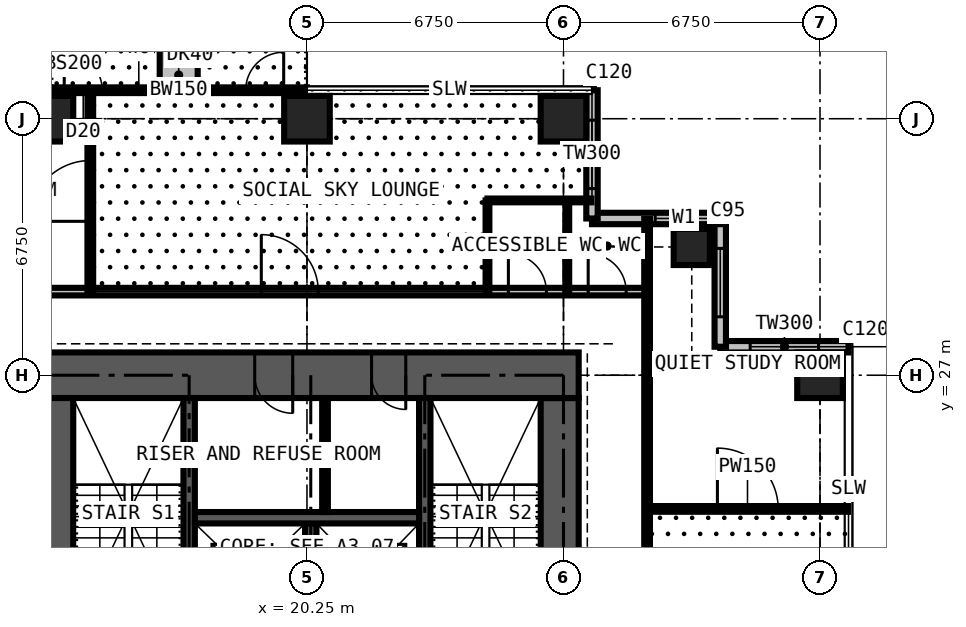
"""IFC4 building model, lengths in metres.
Left out: names, types, materials, properties, quantities, classifications, styles, units other than length and angle.
Written with IfcOpenShell. Run it as: python <this file> out.ifc"""

import sys

from ifc_helpers import new_model, si_unit, direction, frame, frame_2d, origin, origin_2d, place, context, subcontext, project, spatial, rectangle, extrude, element, fill, save


model = new_model("IFC4")
c1 = context("Model", 3, precision=1e-05, world=origin(), true_north=direction((0.0, 1.0)))
c2 = subcontext(c1, "Body", "Model", "MODEL_VIEW")
j1 = project(units=[si_unit("LENGTHUNIT", "METRE"), si_unit("PLANEANGLEUNIT", "RADIAN")], contexts=[c1])
p1 = place(None, origin())
s1 = spatial("IfcSite", under=j1, at=p1, CompositionType="ELEMENT")
p2 = place(p1, origin())
s2 = spatial("IfcBuilding", under=s1, at=p2, CompositionType="ELEMENT")
p3 = place(p2, frame((0.0, 0.0, 171.0)))
s3 = spatial("IfcBuildingStorey", under=s2, at=p3, CompositionType="ELEMENT", Elevation=171.0)
for number, where, z_axis, x_axis in (
    (1, (13.5, 33.75, 0.0), (0.0, 0.0, 1.0), (1.0, 0.0, 0.0)),
    (2, (20.25, 33.75, 0.0), (0.0, 0.0, 1.0), (1.0, 0.0, 0.0)),
    (3, (27.0, 33.75, 0.0), (0.0, 0.0, 1.0), (1.0, 0.0, 0.0)),
):
    element("IfcColumn", number, at=place(p3, frame(where, z_axis=z_axis, x_axis=x_axis)), inside=s3, PredefinedType="COLUMN", context=c2, shape_type="SweptSolid", body=[
        extrude(rectangle(XDim=1.2, YDim=1.2, at=origin_2d()), origin(), (0.0, 0.0, 1.0), 3.6),
    ])
p4 = place(p3, frame((30.375, 30.375, 0.0), z_axis=(0.0, 0.0, 1.0), x_axis=(1.0, 0.0, 0.0)))
e4 = element("IfcColumn", 4, at=p4, inside=s3, PredefinedType="COLUMN", context=c2, shape_type="SweptSolid", body=[
    extrude(rectangle(XDim=0.95, YDim=0.95, at=origin_2d()), origin(), (0.0, 0.0, 1.0), 3.6),
])
p5 = place(p3, frame((33.75, 27.0, 0.0), z_axis=(0.0, 0.0, 1.0), x_axis=(1.0, 0.0, 0.0)))
e5 = element("IfcColumn", 5, at=p5, inside=s3, PredefinedType="COLUMN", context=c2, shape_type="SweptSolid", body=[
    extrude(rectangle(XDim=1.2, YDim=1.2, at=origin_2d()), origin(), (0.0, 0.0, 1.0), 3.6),
])
p6 = place(p3, frame((26.9, 14.1, 0.0), z_axis=(0.0, 0.0, 1.0), x_axis=(0.0, 1.0, 0.0)))
e6 = element("IfcWall", 6, at=p6, inside=s3, PredefinedType="SHEAR", context=c2, shape_type="SweptSolid", body=[
    extrude(rectangle(XDim=12.3, YDim=1.0, at=frame_2d((6.15, 0.0))), origin(), (0.0, 0.0, 1.0), 3.6),
])
p7 = place(p6, frame((3.65, 0.0, 0.0)))
e7 = element("IfcOpeningElement", 7, at=p7, cuts=e6, PredefinedType="OPENING", context=c2, shape_type="SweptSolid", body=[
    extrude(rectangle(XDim=1.2, YDim=2.2, at=frame_2d((0.6, 1.1))), frame((0.0, 0.51, 0.0), z_axis=(0.0, -1.0, 0.0), x_axis=(1.0, 0.0, 0.0)), (0.0, 0.0, 1.0), 1.02),
])
p8 = place(p3, frame((27.4, 27.0, 0.0), z_axis=(0.0, 0.0, 1.0), x_axis=(-1.0, 0.0, 0.0)))
e8 = element("IfcWall", 8, at=p8, inside=s3, PredefinedType="SHEAR", context=c2, shape_type="SweptSolid", body=[
    extrude(rectangle(XDim=14.3, YDim=1.2, at=frame_2d((7.15, 0.0))), origin(), (0.0, 0.0, 1.0), 3.6),
])
p9 = place(p8, frame((4.55, 0.0, 0.0)))
e9 = element("IfcOpeningElement", 9, at=p9, cuts=e8, PredefinedType="OPENING", context=c2, shape_type="SweptSolid", body=[
    extrude(rectangle(XDim=0.9, YDim=2.2, at=frame_2d((0.45, 1.1))), frame((0.0, 0.61, 0.0), z_axis=(0.0, -1.0, 0.0), x_axis=(1.0, 0.0, 0.0)), (0.0, 0.0, 1.0), 1.22),
])
p10 = place(p8, frame((7.525, 0.0, 0.0)))
e10 = element("IfcOpeningElement", 10, at=p10, cuts=e8, PredefinedType="OPENING", context=c2, shape_type="SweptSolid", body=[
    extrude(rectangle(XDim=1.0, YDim=2.2, at=frame_2d((0.5, 1.1))), frame((0.0, 0.61, 0.0), z_axis=(0.0, -1.0, 0.0), x_axis=(1.0, 0.0, 0.0)), (0.0, 0.0, 1.0), 1.22),
])
p11 = place(p3, frame((13.6, 26.4, 0.0), z_axis=(0.0, 0.0, 1.0), x_axis=(0.0, -1.0, 0.0)))
e11 = element("IfcWall", 11, at=p11, inside=s3, PredefinedType="SHEAR", context=c2, shape_type="SweptSolid", body=[
    extrude(rectangle(XDim=12.3, YDim=1.0, at=frame_2d((6.15, 0.0))), origin(), (0.0, 0.0, 1.0), 3.6),
])
p12 = place(p11, frame((7.45, 0.0, 0.0)))
e12 = element("IfcOpeningElement", 12, at=p12, cuts=e11, PredefinedType="OPENING", context=c2, shape_type="SweptSolid", body=[
    extrude(rectangle(XDim=1.2, YDim=2.2, at=frame_2d((0.6, 1.1))), frame((0.0, 0.51, 0.0), z_axis=(0.0, -1.0, 0.0), x_axis=(1.0, 0.0, 0.0)), (0.0, 0.0, 1.0), 1.02),
])
p13 = place(p3, frame((34.5, 27.75, 0.0), z_axis=(0.0, 0.0, 1.0), x_axis=(-1.0, 0.0, 0.0)))
e13 = element("IfcWall", 13, at=p13, inside=s3, PredefinedType="SOLIDWALL", context=c2, shape_type="SweptSolid", body=[
    extrude(rectangle(XDim=3.375, YDim=0.3, at=frame_2d((1.688, 0.0))), origin(), (0.0, 0.0, 1.0), 3.375),
])
p14 = place(p13, frame((0.788, 0.0, 0.6)))
e14 = element("IfcOpeningElement", 14, at=p14, cuts=e13, PredefinedType="OPENING", context=c2, shape_type="SweptSolid", body=[
    extrude(rectangle(XDim=1.8, YDim=2.1, at=frame_2d((0.9, 1.05))), frame((0.0, 0.16, 0.0), z_axis=(0.0, -1.0, 0.0), x_axis=(1.0, 0.0, 0.0)), (0.0, 0.0, 1.0), 0.32),
])
p15 = place(p3, frame((31.125, 27.75, 0.0), z_axis=(0.0, 0.0, 1.0), x_axis=(0.0, 1.0, 0.0)))
e15 = element("IfcWall", 15, at=p15, inside=s3, PredefinedType="SOLIDWALL", context=c2, shape_type="SweptSolid", body=[
    extrude(rectangle(XDim=3.375, YDim=0.3, at=frame_2d((1.688, 0.0))), origin(), (0.0, 0.0, 1.0), 3.375),
])
p16 = place(p15, frame((0.788, 0.0, 0.6)))
e16 = element("IfcOpeningElement", 16, at=p16, cuts=e15, PredefinedType="OPENING", context=c2, shape_type="SweptSolid", body=[
    extrude(rectangle(XDim=1.8, YDim=2.1, at=frame_2d((0.9, 1.05))), frame((0.0, 0.16, 0.0), z_axis=(0.0, -1.0, 0.0), x_axis=(1.0, 0.0, 0.0)), (0.0, 0.0, 1.0), 0.32),
])
p17 = place(p3, frame((31.125, 31.125, 0.0), z_axis=(0.0, 0.0, 1.0), x_axis=(-1.0, 0.0, 0.0)))
e17 = element("IfcWall", 17, at=p17, inside=s3, PredefinedType="SOLIDWALL", context=c2, shape_type="SweptSolid", body=[
    extrude(rectangle(XDim=3.375, YDim=0.3, at=frame_2d((1.688, 0.0))), origin(), (0.0, 0.0, 1.0), 3.375),
])
p18 = place(p17, frame((0.212, 0.0, 0.9)))
e18 = element("IfcOpeningElement", 18, at=p18, cuts=e17, PredefinedType="OPENING", context=c2, shape_type="SweptSolid", body=[
    extrude(rectangle(XDim=1.5, YDim=1.8, at=frame_2d((0.75, 0.9))), frame((0.0, 0.16, 0.0), z_axis=(0.0, -1.0, 0.0), x_axis=(1.0, 0.0, 0.0)), (0.0, 0.0, 1.0), 0.32),
])
p19 = place(p3, frame((27.75, 31.125, 0.0), z_axis=(0.0, 0.0, 1.0), x_axis=(0.0, 1.0, 0.0)))
e19 = element("IfcWall", 19, at=p19, inside=s3, PredefinedType="SOLIDWALL", context=c2, shape_type="SweptSolid", body=[
    extrude(rectangle(XDim=3.375, YDim=0.3, at=frame_2d((1.688, 0.0))), origin(), (0.0, 0.0, 1.0), 3.375),
])
p20 = place(p19, frame((0.788, 0.0, 0.6)))
e20 = element("IfcOpeningElement", 20, at=p20, cuts=e19, PredefinedType="OPENING", context=c2, shape_type="SweptSolid", body=[
    extrude(rectangle(XDim=1.8, YDim=2.1, at=frame_2d((0.9, 1.05))), frame((0.0, 0.16, 0.0), z_axis=(0.0, -1.0, 0.0), x_axis=(1.0, 0.0, 0.0)), (0.0, 0.0, 1.0), 0.32),
])
p21 = place(p3, frame((13.5, 34.5, 0.0), z_axis=(0.0, 0.0, 1.0), x_axis=(1.0, 0.0, 0.0)))
e21 = element("IfcWall", 21, at=p21, inside=s3, PredefinedType="SOLIDWALL", context=c2, shape_type="SweptSolid", body=[
    extrude(rectangle(XDim=6.75, YDim=0.15, at=frame_2d((3.375, 0.0))), origin(), (0.0, 0.0, 1.0), 3.375),
])
p22 = place(p21, frame((0.363, 0.0, 0.0)))
e22 = element("IfcOpeningElement", 22, at=p22, cuts=e21, PredefinedType="OPENING", context=c2, shape_type="SweptSolid", body=[
    extrude(rectangle(XDim=1.0, YDim=2.2, at=frame_2d((0.5, 1.1))), frame((0.0, 0.085, 0.0), z_axis=(0.0, -1.0, 0.0), x_axis=(1.0, 0.0, 0.0)), (0.0, 0.0, 1.0), 0.17),
])
p23 = place(p21, frame((1.725, 0.0, 0.9)))
e23 = element("IfcOpeningElement", 23, at=p23, cuts=e21, PredefinedType="OPENING", context=c2, shape_type="SweptSolid", body=[
    extrude(rectangle(XDim=1.2, YDim=1.8, at=frame_2d((0.6, 0.9))), frame((0.0, 0.085, 0.0), z_axis=(0.0, -1.0, 0.0), x_axis=(1.0, 0.0, 0.0)), (0.0, 0.0, 1.0), 0.17),
])
p24 = place(p21, frame((5.137, 0.0, 0.0)))
e24 = element("IfcOpeningElement", 24, at=p24, cuts=e21, PredefinedType="OPENING", context=c2, shape_type="SweptSolid", body=[
    extrude(rectangle(XDim=1.0, YDim=2.2, at=frame_2d((0.5, 1.1))), frame((0.0, 0.085, 0.0), z_axis=(0.0, -1.0, 0.0), x_axis=(1.0, 0.0, 0.0)), (0.0, 0.0, 1.0), 0.17),
])
p25 = place(p21, frame((3.825, 0.0, 0.9)))
e25 = element("IfcOpeningElement", 25, at=p25, cuts=e21, PredefinedType="OPENING", context=c2, shape_type="SweptSolid", body=[
    extrude(rectangle(XDim=1.2, YDim=1.8, at=frame_2d((0.6, 0.9))), frame((0.0, 0.085, 0.0), z_axis=(0.0, -1.0, 0.0), x_axis=(1.0, 0.0, 0.0)), (0.0, 0.0, 1.0), 0.17),
])
p26 = place(p3, frame((16.875, 34.6, 0.0), z_axis=(0.0, 0.0, 1.0), x_axis=(0.0, 1.0, 0.0)))
e26 = element("IfcWall", 26, at=p26, inside=s3, PredefinedType="USERDEFINED", context=c2, shape_type="SweptSolid", body=[
    extrude(rectangle(XDim=2.2, YDim=1.0, at=frame_2d((1.1, 0.0))), origin(), (0.0, 0.0, 1.0), 0.9),
])
for number, where, z_axis, x_axis in (
    (27, (17.15, 20.3, 0.0), (0.0, 0.0, 1.0), (0.0, 1.0, 0.0)),
    (28, (23.35, 20.3, 0.0), (0.0, 0.0, 1.0), (0.0, 1.0, 0.0)),
):
    element("IfcWall", number, at=place(p3, frame(where, z_axis=z_axis, x_axis=x_axis)), inside=s3, PredefinedType="SHEAR", context=c2, shape_type="SweptSolid", body=[
        extrude(rectangle(XDim=6.1, YDim=0.3, at=frame_2d((3.05, 0.0))), origin(), (0.0, 0.0, 1.0), 3.6),
    ])
p27 = place(p3, frame((20.35, 20.3, 0.0), z_axis=(0.0, 0.0, 1.0), x_axis=(0.0, 1.0, 0.0)))
e29 = element("IfcWall", 29, at=p27, inside=s3, PredefinedType="SHEAR", context=c2, shape_type="SweptSolid", body=[
    extrude(rectangle(XDim=2.8, YDim=0.3, at=frame_2d((1.4, 0.0))), origin(), (0.0, 0.0, 1.0), 3.6),
])
p28 = place(p3, frame((17.3, 23.25, 0.0), z_axis=(0.0, 0.0, 1.0), x_axis=(1.0, 0.0, 0.0)))
e30 = element("IfcWall", 30, at=p28, inside=s3, PredefinedType="SHEAR", context=c2, shape_type="SweptSolid", body=[
    extrude(rectangle(XDim=5.9, YDim=0.3, at=frame_2d((2.95, 0.0))), origin(), (0.0, 0.0, 1.0), 3.6),
])
p29 = place(p3, frame((20.725, 23.4, 0.0), z_axis=(0.0, 0.0, 1.0), x_axis=(0.0, 1.0, 0.0)))
e31 = element("IfcWall", 31, at=p29, inside=s3, PredefinedType="PARTITIONING", context=c2, shape_type="SweptSolid", body=[
    extrude(rectangle(XDim=3.0, YDim=0.15, at=frame_2d((1.5, 0.0))), origin(), (0.0, 0.0, 1.0), 3.375),
])
p30 = place(p3, frame((11.3, 29.2, 0.0), z_axis=(0.0, 0.0, 1.0), x_axis=(1.0, 0.0, 0.0)))
e32 = element("IfcWall", 32, at=p30, inside=s3, PredefinedType="PARTITIONING", context=c2, shape_type="SweptSolid", body=[
    extrude(rectangle(XDim=17.9, YDim=0.2, at=frame_2d((8.95, 0.0))), origin(), (0.0, 0.0, 1.0), 3.375),
])
p31 = place(p30, frame((14.25, 0.0, 0.0)))
e33 = element("IfcOpeningElement", 33, at=p31, cuts=e32, PredefinedType="OPENING", context=c2, shape_type="SweptSolid", body=[
    extrude(rectangle(XDim=1.0, YDim=2.2, at=frame_2d((0.5, 1.1))), frame((0.0, 0.11, 0.0), z_axis=(0.0, -1.0, 0.0), x_axis=(1.0, 0.0, 0.0)), (0.0, 0.0, 1.0), 0.22),
])
p32 = place(p30, frame((16.35, 0.0, 0.0)))
e34 = element("IfcOpeningElement", 34, at=p32, cuts=e32, PredefinedType="OPENING", context=c2, shape_type="SweptSolid", body=[
    extrude(rectangle(XDim=1.0, YDim=2.2, at=frame_2d((0.5, 1.1))), frame((0.0, 0.11, 0.0), z_axis=(0.0, -1.0, 0.0), x_axis=(1.0, 0.0, 0.0)), (0.0, 0.0, 1.0), 0.22),
])
p33 = place(p30, frame((7.749, 0.0, 0.0)))
e35 = element("IfcOpeningElement", 35, at=p33, cuts=e32, PredefinedType="OPENING", context=c2, shape_type="SweptSolid", body=[
    extrude(rectangle(XDim=1.5, YDim=2.2, at=frame_2d((0.75, 1.1))), frame((0.0, 0.11, 0.0), z_axis=(0.0, -1.0, 0.0), x_axis=(1.0, 0.0, 0.0)), (0.0, 0.0, 1.0), 0.22),
])
p34 = place(p3, frame((14.549, 29.2, 0.0), z_axis=(0.0, 0.0, 1.0), x_axis=(0.0, 1.0, 0.0)))
e36 = element("IfcWall", 36, at=p34, inside=s3, PredefinedType="PARTITIONING", context=c2, shape_type="SweptSolid", body=[
    extrude(rectangle(XDim=5.225, YDim=0.15, at=frame_2d((2.613, 0.0))), origin(), (0.0, 0.0, 1.0), 3.375),
])
p35 = place(p34, frame((1.85, 0.0, 0.0)))
e37 = element("IfcOpeningElement", 37, at=p35, cuts=e36, PredefinedType="OPENING", context=c2, shape_type="SweptSolid", body=[
    extrude(rectangle(XDim=1.6, YDim=2.4, at=frame_2d((0.8, 1.2))), frame((0.0, 0.085, 0.0), z_axis=(0.0, -1.0, 0.0), x_axis=(1.0, 0.0, 0.0)), (0.0, 0.0, 1.0), 0.17),
])
p36 = place(p3, frame((25.0, 29.2, 0.0), z_axis=(0.0, 0.0, 1.0), x_axis=(0.0, 1.0, 0.0)))
e38 = element("IfcWall", 38, at=p36, inside=s3, PredefinedType="PARTITIONING", context=c2, shape_type="SweptSolid", body=[
    extrude(rectangle(XDim=2.4, YDim=0.1, at=frame_2d((1.2, 0.0))), origin(), (0.0, 0.0, 1.0), 3.375),
])
p37 = place(p3, frame((25.0, 31.6, 0.0), z_axis=(0.0, 0.0, 1.0), x_axis=(1.0, 0.0, 0.0)))
e39 = element("IfcWall", 39, at=p37, inside=s3, PredefinedType="PARTITIONING", context=c2, shape_type="SweptSolid", body=[
    extrude(rectangle(XDim=2.734, YDim=0.1, at=frame_2d((1.367, 0.0))), origin(), (0.0, 0.0, 1.0), 3.375),
])
p38 = place(p3, frame((27.1, 29.2, 0.0), z_axis=(0.0, 0.0, 1.0), x_axis=(0.0, 1.0, 0.0)))
e40 = element("IfcWall", 40, at=p38, inside=s3, PredefinedType="PARTITIONING", context=c2, shape_type="SweptSolid", body=[
    extrude(rectangle(XDim=2.4, YDim=0.1, at=frame_2d((1.2, 0.0))), origin(), (0.0, 0.0, 1.0), 2.806),
])
p39 = place(p3, frame((29.2, 11.3, 0.0), z_axis=(0.0, 0.0, 1.0), x_axis=(0.0, 1.0, 0.0)))
e41 = element("IfcWall", 41, at=p39, inside=s3, PredefinedType="PARTITIONING", context=c2, shape_type="SweptSolid", body=[
    extrude(rectangle(XDim=19.809, YDim=0.15, at=frame_2d((9.904, 0.0))), origin(), (0.0, 0.0, 1.0), 3.375),
])
p40 = place(p39, frame((0.55, 0.0, 0.0)))
e42 = element("IfcOpeningElement", 42, at=p40, cuts=e41, PredefinedType="OPENING", context=c2, shape_type="SweptSolid", body=[
    extrude(rectangle(XDim=1.0, YDim=2.2, at=frame_2d((0.5, 1.1))), frame((0.0, 0.085, 0.0), z_axis=(0.0, -1.0, 0.0), x_axis=(1.0, 0.0, 0.0)), (0.0, 0.0, 1.0), 0.17),
])
p41 = place(p39, frame((2.65, 0.0, 0.0)))
e43 = element("IfcOpeningElement", 43, at=p41, cuts=e41, PredefinedType="OPENING", context=c2, shape_type="SweptSolid", body=[
    extrude(rectangle(XDim=1.0, YDim=2.2, at=frame_2d((0.5, 1.1))), frame((0.0, 0.085, 0.0), z_axis=(0.0, -1.0, 0.0), x_axis=(1.0, 0.0, 0.0)), (0.0, 0.0, 1.0), 0.17),
])
p42 = place(p39, frame((7.45, 0.0, 0.0)))
e44 = element("IfcOpeningElement", 44, at=p42, cuts=e41, PredefinedType="OPENING", context=c2, shape_type="SweptSolid", body=[
    extrude(rectangle(XDim=1.5, YDim=2.2, at=frame_2d((0.75, 1.1))), frame((0.0, 0.085, 0.0), z_axis=(0.0, -1.0, 0.0), x_axis=(1.0, 0.0, 0.0)), (0.0, 0.0, 1.0), 0.17),
])
p43 = place(p3, frame((29.2, 23.482, 0.0), z_axis=(0.0, 0.0, 1.0), x_axis=(1.0, 0.0, 0.0)))
e45 = element("IfcWall", 45, at=p43, inside=s3, PredefinedType="PARTITIONING", context=c2, shape_type="SweptSolid", body=[
    extrude(rectangle(XDim=5.284, YDim=0.15, at=frame_2d((2.642, 0.0))), origin(), (0.0, 0.0, 1.0), 3.375),
])
p44 = place(p43, frame((1.85, 0.0, 0.0)))
e46 = element("IfcOpeningElement", 46, at=p44, cuts=e45, PredefinedType="OPENING", context=c2, shape_type="SweptSolid", body=[
    extrude(rectangle(XDim=1.6, YDim=2.4, at=frame_2d((0.8, 1.2))), frame((0.0, 0.085, 0.0), z_axis=(0.0, -1.0, 0.0), x_axis=(1.0, 0.0, 0.0)), (0.0, 0.0, 1.0), 0.17),
])
p45 = place(p14, origin())
e47 = element("IfcWindow", 47, at=p45, inside=s3, PartitioningType="SINGLE_PANEL", PredefinedType="WINDOW", context=c2, shape_type="SweptSolid", body=[
    extrude(rectangle(XDim=1.8, YDim=2.1, at=frame_2d((0.9, 1.05))), frame((0.0, 0.03, 0.0), z_axis=(0.0, -1.0, 0.0), x_axis=(1.0, 0.0, 0.0)), (0.0, 0.0, 1.0), 0.06),
])
fill(e14, e47)
p46 = place(p16, origin())
e48 = element("IfcWindow", 48, at=p46, inside=s3, PartitioningType="SINGLE_PANEL", PredefinedType="WINDOW", context=c2, shape_type="SweptSolid", body=[
    extrude(rectangle(XDim=1.8, YDim=2.1, at=frame_2d((0.9, 1.05))), frame((0.0, 0.03, 0.0), z_axis=(0.0, -1.0, 0.0), x_axis=(1.0, 0.0, 0.0)), (0.0, 0.0, 1.0), 0.06),
])
fill(e16, e48)
p47 = place(p18, origin())
e49 = element("IfcWindow", 49, at=p47, inside=s3, PartitioningType="SINGLE_PANEL", PredefinedType="WINDOW", context=c2, shape_type="SweptSolid", body=[
    extrude(rectangle(XDim=1.5, YDim=1.8, at=frame_2d((0.75, 0.9))), frame((0.0, 0.03, 0.0), z_axis=(0.0, -1.0, 0.0), x_axis=(1.0, 0.0, 0.0)), (0.0, 0.0, 1.0), 0.06),
])
fill(e18, e49)
p48 = place(p20, origin())
e50 = element("IfcWindow", 50, at=p48, inside=s3, PartitioningType="SINGLE_PANEL", PredefinedType="WINDOW", context=c2, shape_type="SweptSolid", body=[
    extrude(rectangle(XDim=1.8, YDim=2.1, at=frame_2d((0.9, 1.05))), frame((0.0, 0.03, 0.0), z_axis=(0.0, -1.0, 0.0), x_axis=(1.0, 0.0, 0.0)), (0.0, 0.0, 1.0), 0.06),
])
fill(e20, e50)
p49 = place(p22, origin())
e51 = element("IfcDoor", 51, at=p49, inside=s3, OperationType="SINGLE_SWING_LEFT", PredefinedType="DOOR", context=c2, shape_type="SweptSolid", body=[
    extrude(rectangle(XDim=1.0, YDim=2.2, at=frame_2d((0.5, 1.1))), frame((0.0, 0.025, 0.0), z_axis=(0.0, -1.0, 0.0), x_axis=(1.0, 0.0, 0.0)), (0.0, 0.0, 1.0), 0.05),
])
fill(e22, e51)
p50 = place(p23, origin())
e52 = element("IfcWindow", 52, at=p50, inside=s3, PartitioningType="SINGLE_PANEL", PredefinedType="WINDOW", context=c2, shape_type="SweptSolid", body=[
    extrude(rectangle(XDim=1.2, YDim=1.8, at=frame_2d((0.6, 0.9))), frame((0.0, 0.03, 0.0), z_axis=(0.0, -1.0, 0.0), x_axis=(1.0, 0.0, 0.0)), (0.0, 0.0, 1.0), 0.06),
])
fill(e23, e52)
p51 = place(p24, origin())
e53 = element("IfcDoor", 53, at=p51, inside=s3, OperationType="SINGLE_SWING_RIGHT", PredefinedType="DOOR", context=c2, shape_type="SweptSolid", body=[
    extrude(rectangle(XDim=1.0, YDim=2.2, at=frame_2d((0.5, 1.1))), frame((0.0, 0.025, 0.0), z_axis=(0.0, -1.0, 0.0), x_axis=(1.0, 0.0, 0.0)), (0.0, 0.0, 1.0), 0.05),
])
fill(e24, e53)
p52 = place(p25, origin())
e54 = element("IfcWindow", 54, at=p52, inside=s3, PartitioningType="SINGLE_PANEL", PredefinedType="WINDOW", context=c2, shape_type="SweptSolid", body=[
    extrude(rectangle(XDim=1.2, YDim=1.8, at=frame_2d((0.6, 0.9))), frame((0.0, 0.03, 0.0), z_axis=(0.0, -1.0, 0.0), x_axis=(1.0, 0.0, 0.0)), (0.0, 0.0, 1.0), 0.06),
])
fill(e25, e54)
p53 = place(p9, origin())
e55 = element("IfcDoor", 55, at=p53, inside=s3, OperationType="SINGLE_SWING_LEFT", PredefinedType="DOOR", context=c2, shape_type="SweptSolid", body=[
    extrude(rectangle(XDim=0.9, YDim=2.2, at=frame_2d((0.45, 1.1))), frame((0.0, 0.4, 0.0), z_axis=(0.0, -1.0, 0.0), x_axis=(1.0, 0.0, 0.0)), (0.0, 0.0, 1.0), 0.8),
])
fill(e9, e55)
p54 = place(p10, origin())
e56 = element("IfcDoor", 56, at=p54, inside=s3, OperationType="SINGLE_SWING_LEFT", PredefinedType="DOOR", context=c2, shape_type="SweptSolid", body=[
    extrude(rectangle(XDim=1.0, YDim=2.2, at=frame_2d((0.5, 1.1))), frame((0.0, 0.025, 0.0), z_axis=(0.0, -1.0, 0.0), x_axis=(1.0, 0.0, 0.0)), (0.0, 0.0, 1.0), 0.05),
])
fill(e10, e56)
p55 = place(p44, origin())
e57 = element("IfcDoor", 57, at=p55, inside=s3, OperationType="DOUBLE_DOOR_SINGLE_SWING", PredefinedType="DOOR", context=c2, shape_type="SweptSolid", body=[
    extrude(rectangle(XDim=1.6, YDim=2.4, at=frame_2d((0.8, 1.2))), frame((0.0, 0.025, 0.0), z_axis=(0.0, -1.0, 0.0), x_axis=(1.0, 0.0, 0.0)), (0.0, 0.0, 1.0), 0.05),
])
fill(e46, e57)
p56 = place(p31, origin())
e58 = element("IfcDoor", 58, at=p56, inside=s3, OperationType="SINGLE_SWING_LEFT", PredefinedType="DOOR", context=c2, shape_type="SweptSolid", body=[
    extrude(rectangle(XDim=1.0, YDim=2.2, at=frame_2d((0.5, 1.1))), frame((0.0, 0.025, 0.0), z_axis=(0.0, -1.0, 0.0), x_axis=(1.0, 0.0, 0.0)), (0.0, 0.0, 1.0), 0.05),
])
fill(e33, e58)
p57 = place(p32, origin())
e59 = element("IfcDoor", 59, at=p57, inside=s3, OperationType="SINGLE_SWING_LEFT", PredefinedType="DOOR", context=c2, shape_type="SweptSolid", body=[
    extrude(rectangle(XDim=1.0, YDim=2.2, at=frame_2d((0.5, 1.1))), frame((0.0, 0.025, 0.0), z_axis=(0.0, -1.0, 0.0), x_axis=(1.0, 0.0, 0.0)), (0.0, 0.0, 1.0), 0.05),
])
fill(e34, e59)
p58 = place(p35, origin())
e60 = element("IfcDoor", 60, at=p58, inside=s3, OperationType="DOUBLE_DOOR_SINGLE_SWING", PredefinedType="DOOR", context=c2, shape_type="SweptSolid", body=[
    extrude(rectangle(XDim=1.6, YDim=2.4, at=frame_2d((0.8, 1.2))), frame((0.0, 0.025, 0.0), z_axis=(0.0, -1.0, 0.0), x_axis=(1.0, 0.0, 0.0)), (0.0, 0.0, 1.0), 0.05),
])
fill(e37, e60)
p59 = place(p33, origin())
e61 = element("IfcDoor", 61, at=p59, inside=s3, OperationType="DOUBLE_DOOR_SINGLE_SWING", PredefinedType="DOOR", context=c2, shape_type="SweptSolid", body=[
    extrude(rectangle(XDim=1.5, YDim=2.2, at=frame_2d((0.75, 1.1))), frame((0.0, 0.025, 0.0), z_axis=(0.0, -1.0, 0.0), x_axis=(1.0, 0.0, 0.0)), (0.0, 0.0, 1.0), 0.05),
])
fill(e35, e61)
save(model, sys.argv[1])
